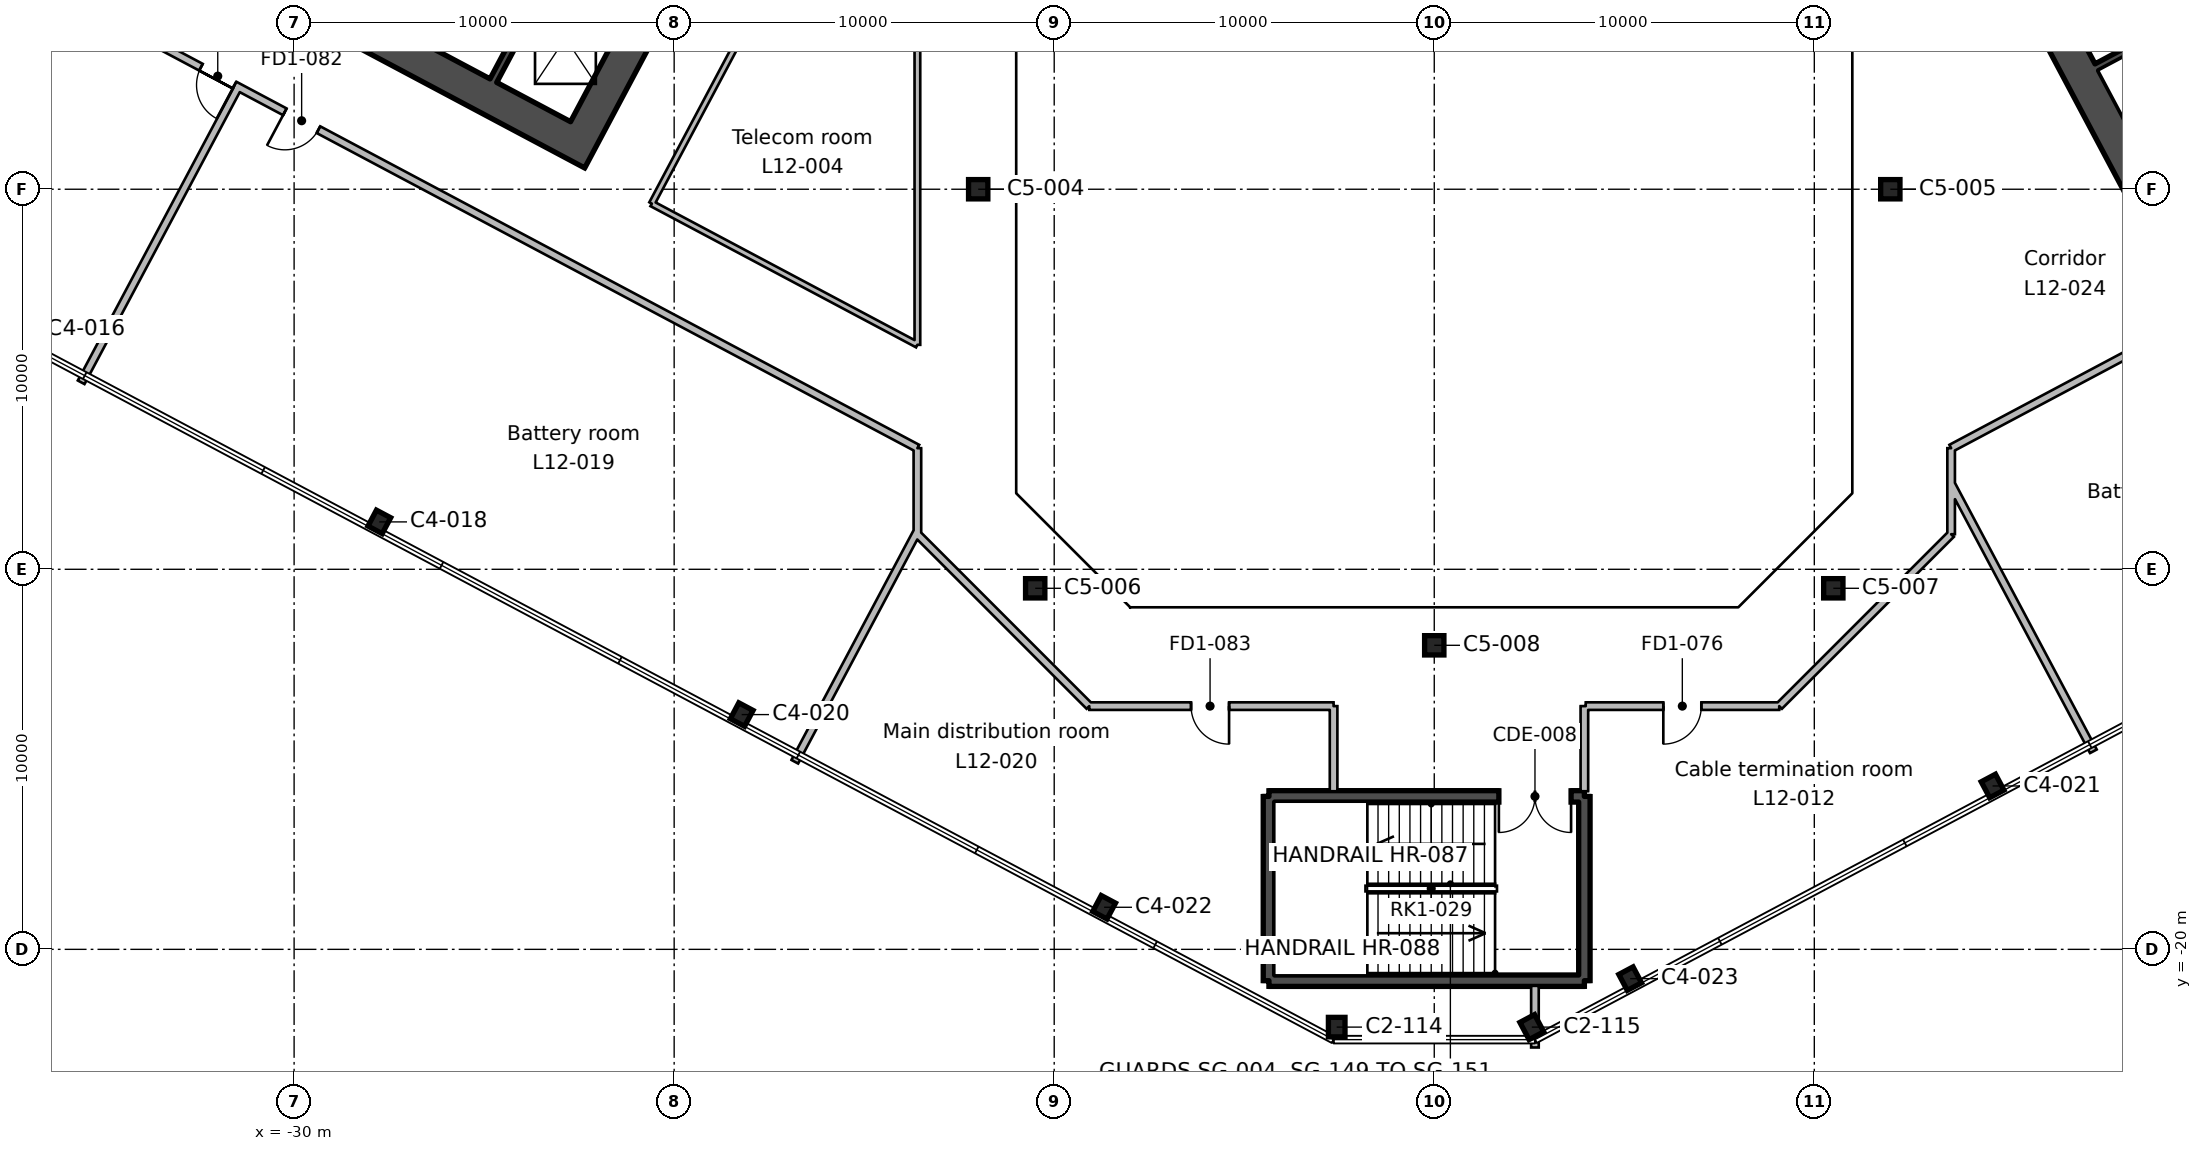
"""IFC4 building model, lengths in metres.
Left out: names, types, materials, properties, quantities, classifications, styles, units other than length and angle.
Written with IfcOpenShell. Run it as: python <this file> out.ifc"""

import sys

from ifc_helpers import new_model, si_unit, direction, frame, frame_2d, origin, origin_2d, place, context, subcontext, project, spatial, rectangle, hollow_rectangle, i_section, extrude, element, fill, save


model = new_model("IFC4")
c1 = context("Model", 3, precision=1e-05, world=origin(), true_north=direction((0.0, 1.0)))
c2 = subcontext(c1, "Body", "Model", "MODEL_VIEW")
j1 = project(units=[si_unit("LENGTHUNIT", "METRE"), si_unit("PLANEANGLEUNIT", "RADIAN")], contexts=[c1])
p1 = place(None, origin())
s1 = spatial("IfcSite", under=j1, at=p1, CompositionType="ELEMENT")
p2 = place(p1, origin())
s2 = spatial("IfcBuilding", under=s1, at=p2, CompositionType="ELEMENT")
p3 = place(p2, frame((0.0, 0.0, 66.2)))
s3 = spatial("IfcBuildingStorey", under=s2, at=p3, CompositionType="ELEMENT", Elevation=66.2)
for number, where, z_axis, x_axis in (
    (1, (-2.567, -22.046, 0.0), (0.0, 0.0, 1.0), (1.0, 0.0, 0.0)),
    (2, (2.567, -22.046, 0.0), (0.0, 0.0, 1.0), (0.883, 0.469, 0.0)),
):
    element("IfcColumn", number, at=place(p3, frame(where, z_axis=z_axis, x_axis=x_axis)), inside=s3, PredefinedType="COLUMN", context=c2, shape_type="SweptSolid", body=[
        extrude(i_section(OverallWidth=0.437, OverallDepth=0.513, WebThickness=0.061, FlangeThickness=0.097, FilletRadius=0.015, at=origin_2d()), origin(), (0.0, 0.0, 1.0), 4.6),
    ])
for number, where, z_axis, x_axis in (
    (3, (5.155, -20.771, 0.0), (0.0, 0.0, 1.0), (0.883, 0.469, 0.0)),
    (4, (-8.687, -18.893, 0.0), (0.0, 0.0, 1.0), (0.883, -0.469, 0.0)),
    (5, (14.691, -15.701, 0.0), (0.0, 0.0, 1.0), (0.883, 0.469, 0.0)),
    (6, (-18.223, -13.823, 0.0), (0.0, 0.0, 1.0), (0.883, -0.469, 0.0)),
):
    element("IfcColumn", number, at=place(p3, frame(where, z_axis=z_axis, x_axis=x_axis)), inside=s3, PredefinedType="COLUMN", context=c2, shape_type="SweptSolid", body=[
        extrude(i_section(OverallWidth=0.424, OverallDepth=0.475, WebThickness=0.048, FlangeThickness=0.077, FilletRadius=0.015, at=origin_2d()), origin(), (0.0, 0.0, 1.0), 4.6),
    ])
for number, where, z_axis, x_axis in (
    (7, (0.0, -12.0, 0.0), (0.0, 0.0, 1.0), (1.0, 0.0, 0.0)),
    (8, (-10.5, -10.5, 0.0), (0.0, 0.0, 1.0), (1.0, 0.0, 0.0)),
    (9, (10.5, -10.5, 0.0), (0.0, 0.0, 1.0), (1.0, 0.0, 0.0)),
):
    element("IfcColumn", number, at=place(p3, frame(where, z_axis=z_axis, x_axis=x_axis)), inside=s3, PredefinedType="COLUMN", context=c2, shape_type="SweptSolid", body=[
        extrude(hollow_rectangle(XDim=0.508, YDim=0.508, WallThickness=0.021, InnerFilletRadius=0.01, OuterFilletRadius=0.031, at=origin_2d()), origin(), (0.0, 0.0, 1.0), 4.6),
    ])
p4 = place(p3, frame((-27.758, -8.753, 0.0), z_axis=(0.0, 0.0, 1.0), x_axis=(0.882947592859, -0.469471562786, 0.0)))
e10 = element("IfcColumn", 10, at=p4, inside=s3, PredefinedType="COLUMN", context=c2, shape_type="SweptSolid", body=[
    extrude(i_section(OverallWidth=0.424, OverallDepth=0.475, WebThickness=0.048, FlangeThickness=0.077, FilletRadius=0.015, at=origin_2d()), origin(), (0.0, 0.0, 1.0), 4.6),
])
for number, where, z_axis, x_axis in (
    (11, (-12.0, 0.0, 0.0), (0.0, 0.0, 1.0), (1.0, 0.0, 0.0)),
    (12, (12.0, 0.0, 0.0), (0.0, 0.0, 1.0), (1.0, 0.0, 0.0)),
):
    element("IfcColumn", number, at=place(p3, frame(where, z_axis=z_axis, x_axis=x_axis)), inside=s3, PredefinedType="COLUMN", context=c2, shape_type="SweptSolid", body=[
        extrude(hollow_rectangle(XDim=0.508, YDim=0.508, WallThickness=0.021, InnerFilletRadius=0.01, OuterFilletRadius=0.031, at=origin_2d()), origin(), (0.0, 0.0, 1.0), 4.6),
    ])
p5 = place(p3, frame((-13.362, 18.43, 0.0), z_axis=(0.0, 0.0, 1.0), x_axis=(-0.46947084998, -0.882947971864, 0.0)))
e13 = element("IfcWall", 13, at=p5, inside=s3, PredefinedType="SHEAR", context=c2, shape_type="SweptSolid", body=[
    extrude(rectangle(XDim=20.0, YDim=0.9, at=frame_2d((10.0, 0.0))), origin(), (0.0, 0.0, 1.0), 4.6),
])
p6 = place(p5, frame((7.0, 0.0, 0.0)))
e14 = element("IfcOpeningElement", 14, at=p6, cuts=e13, PredefinedType="OPENING", context=c2, shape_type="SweptSolid", body=[
    extrude(rectangle(XDim=2.4, YDim=2.4, at=frame_2d((1.2, 1.2))), frame((0.0, 0.46, 0.0), z_axis=(0.0, -1.0, 0.0), x_axis=(1.0, 0.0, 0.0)), (0.0, 0.0, 1.0), 0.92),
])
p7 = place(p3, frame((-22.937, 1.38, 0.0), z_axis=(0.0, 0.0, 1.0), x_axis=(-0.88295276571, 0.46946183394, 0.0)))
e15 = element("IfcWall", 15, at=p7, inside=s3, PredefinedType="SHEAR", context=c2, shape_type="SweptSolid", body=[
    extrude(rectangle(XDim=20.2, YDim=0.9, at=frame_2d((10.1, 0.0))), origin(), (0.0, 0.0, 1.0), 4.6),
])
p8 = place(p3, frame((-23.043, 6.08, 0.0), z_axis=(0.0, 0.0, 1.0), x_axis=(-0.469494272526, -0.882935517501, 0.0)))
e16 = element("IfcWall", 16, at=p8, inside=s3, PredefinedType="SHEAR", context=c2, shape_type="SweptSolid", body=[
    extrude(rectangle(XDim=3.65, YDim=0.2, at=frame_2d((1.825, 0.0))), origin(), (0.0, 0.0, 1.0), 4.6),
])
p9 = place(p3, frame((19.219, -1.107, 0.0), z_axis=(0.0, 0.0, 1.0), x_axis=(-0.46947084998, 0.882947971864, 0.0)))
e17 = element("IfcWall", 17, at=p9, inside=s3, PredefinedType="SHEAR", context=c2, shape_type="SweptSolid", body=[
    extrude(rectangle(XDim=20.0, YDim=0.9, at=frame_2d((10.0, 0.0))), origin(), (0.0, 0.0, 1.0), 4.6),
])
p10 = place(p9, frame((7.0, 0.0, 0.0)))
e18 = element("IfcOpeningElement", 18, at=p10, cuts=e17, PredefinedType="OPENING", context=c2, shape_type="SweptSolid", body=[
    extrude(rectangle(XDim=2.4, YDim=2.4, at=frame_2d((1.2, 1.2))), frame((0.0, 0.46, 0.0), z_axis=(0.0, -1.0, 0.0), x_axis=(1.0, 0.0, 0.0)), (0.0, 0.0, 1.0), 0.92),
])
p11 = place(p3, frame((17.434, 3.21, 0.0), z_axis=(0.0, 0.0, 1.0), x_axis=(0.882940221191, 0.469485426614, 0.0)))
e19 = element("IfcWall", 19, at=p11, inside=s3, PredefinedType="SHEAR", context=c2, shape_type="SweptSolid", body=[
    extrude(rectangle(XDim=8.0, YDim=0.2, at=frame_2d((4.0, 0.0))), origin(), (0.0, 0.0, 1.0), 4.6),
])
p12 = place(p3, frame((3.95, -15.975, 0.0), z_axis=(0.0, 0.0, 1.0), x_axis=(0.0, -1.0, 0.0)))
e20 = element("IfcWall", 20, at=p12, inside=s3, PredefinedType="SHEAR", context=c2, shape_type="SweptSolid", body=[
    extrude(rectangle(XDim=4.85, YDim=0.3, at=frame_2d((2.425, 0.0))), origin(), (0.0, 0.0, 1.0), 4.6),
])
p13 = place(p3, frame((3.95, -20.825, 0.0), z_axis=(0.0, 0.0, 1.0), x_axis=(-1.0, 0.0, 0.0)))
e21 = element("IfcWall", 21, at=p13, inside=s3, PredefinedType="SHEAR", context=c2, shape_type="SweptSolid", body=[
    extrude(rectangle(XDim=8.3, YDim=0.3, at=frame_2d((4.15, 0.0))), origin(), (0.0, 0.0, 1.0), 4.6),
])
p14 = place(p3, frame((-4.35, -20.825, 0.0), z_axis=(0.0, 0.0, 1.0), x_axis=(0.0, 1.0, 0.0)))
e22 = element("IfcWall", 22, at=p14, inside=s3, PredefinedType="SHEAR", context=c2, shape_type="SweptSolid", body=[
    extrude(rectangle(XDim=4.85, YDim=0.3, at=frame_2d((2.425, 0.0))), origin(), (0.0, 0.0, 1.0), 4.6),
])
p15 = place(p3, frame((-4.35, -15.975, 0.0), z_axis=(0.0, 0.0, 1.0), x_axis=(1.0, 0.0, 0.0)))
e23 = element("IfcWall", 23, at=p15, inside=s3, PredefinedType="SHEAR", context=c2, shape_type="SweptSolid", body=[
    extrude(rectangle(XDim=8.3, YDim=0.3, at=frame_2d((4.15, 0.0))), origin(), (0.0, 0.0, 1.0), 4.6),
])
p16 = place(p15, frame((6.05, 0.0, 0.0)))
e24 = element("IfcOpeningElement", 24, at=p16, cuts=e23, PredefinedType="OPENING", context=c2, shape_type="SweptSolid", body=[
    extrude(rectangle(XDim=1.9, YDim=2.1, at=frame_2d((0.95, 1.05))), frame((0.0, 0.16, 0.0), z_axis=(0.0, -1.0, 0.0), x_axis=(1.0, 0.0, 0.0)), (0.0, 0.0, 1.0), 0.32),
])
p17 = place(p3, frame((-31.471, 2.69, 0.0), z_axis=(0.0, 0.0, 1.0), x_axis=(-0.469532456729, -0.882915212281, 0.0)))
e25 = element("IfcWall", 25, at=p17, inside=s3, PredefinedType="PARTITIONING", context=c2, shape_type="SweptSolid", body=[
    extrude(rectangle(XDim=8.8, YDim=0.2, at=frame_2d((4.4, 0.0))), origin(), (0.0, 0.0, 1.0), 4.2),
])
p18 = place(p3, frame((-13.6, -9.077, 0.0), z_axis=(0.0, 0.0, 1.0), x_axis=(0.0, 1.0, 0.0)))
e26 = element("IfcWall", 26, at=p18, inside=s3, PredefinedType="PARTITIONING", context=c2, shape_type="SweptSolid", body=[
    extrude(rectangle(XDim=2.264, YDim=0.2, at=frame_2d((1.132, 0.0))), origin(), (0.0, 0.0, 1.0), 4.2),
])
p19 = place(p3, frame((-13.6, -6.813, 0.0), z_axis=(0.0, 0.0, 1.0), x_axis=(-0.882934546757, 0.469496098113, 0.0)))
e27 = element("IfcWall", 27, at=p19, inside=s3, PredefinedType="PARTITIONING", context=c2, shape_type="SweptSolid", body=[
    extrude(rectangle(XDim=36.758, YDim=0.2, at=frame_2d((18.379, 0.0))), origin(), (0.0, 0.0, 1.0), 4.2),
])
p20 = place(p19, frame((20.35, 0.0, 0.0)))
e28 = element("IfcOpeningElement", 28, at=p20, cuts=e27, PredefinedType="OPENING", context=c2, shape_type="SweptSolid", body=[
    extrude(rectangle(XDim=1.0, YDim=2.1, at=frame_2d((0.5, 1.05))), frame((0.0, 0.11, 0.0), z_axis=(0.0, -1.0, 0.0), x_axis=(1.0, 0.0, 0.0)), (0.0, 0.0, 1.0), 0.22),
])
p21 = place(p19, frame((17.85, 0.0, 0.0)))
e29 = element("IfcOpeningElement", 29, at=p21, cuts=e27, PredefinedType="OPENING", context=c2, shape_type="SweptSolid", body=[
    extrude(rectangle(XDim=1.0, YDim=2.1, at=frame_2d((0.5, 1.05))), frame((0.0, 0.11, 0.0), z_axis=(0.0, -1.0, 0.0), x_axis=(1.0, 0.0, 0.0)), (0.0, 0.0, 1.0), 0.22),
])
p22 = place(p3, frame((-13.6, -8.998, 0.0), z_axis=(0.0, 0.0, 1.0), x_axis=(-0.469531053644, -0.882915958438, 0.0)))
e30 = element("IfcWall", 30, at=p22, inside=s3, PredefinedType="PARTITIONING", context=c2, shape_type="SweptSolid", body=[
    extrude(rectangle(XDim=6.87, YDim=0.2, at=frame_2d((3.435, 0.0))), origin(), (0.0, 0.0, 1.0), 4.2),
])
p23 = place(p3, frame((-13.6, -9.077, 0.0), z_axis=(0.0, 0.0, 1.0), x_axis=(0.707106781187, -0.707106781187, 0.0)))
e31 = element("IfcWall", 31, at=p23, inside=s3, PredefinedType="PARTITIONING", context=c2, shape_type="SweptSolid", body=[
    extrude(rectangle(XDim=6.397, YDim=0.2, at=frame_2d((3.198, 0.0))), origin(), (0.0, 0.0, 1.0), 4.2),
])
p24 = place(p3, frame((-2.649, -15.84, 0.0), z_axis=(0.0, 0.0, 1.0), x_axis=(0.0, 1.0, 0.0)))
e32 = element("IfcWall", 32, at=p24, inside=s3, PredefinedType="PARTITIONING", context=c2, shape_type="SweptSolid", body=[
    extrude(rectangle(XDim=2.24, YDim=0.2, at=frame_2d((1.12, 0.0))), origin(), (0.0, 0.0, 1.0), 4.2),
])
p25 = place(p3, frame((-2.649, -13.6, 0.0), z_axis=(0.0, 0.0, 1.0), x_axis=(-1.0, 0.0, 0.0)))
e33 = element("IfcWall", 33, at=p25, inside=s3, PredefinedType="PARTITIONING", context=c2, shape_type="SweptSolid", body=[
    extrude(rectangle(XDim=6.428, YDim=0.2, at=frame_2d((3.214, 0.0))), origin(), (0.0, 0.0, 1.0), 4.2),
])
p26 = place(p25, frame((2.75, 0.0, 0.0)))
e34 = element("IfcOpeningElement", 34, at=p26, cuts=e33, PredefinedType="OPENING", context=c2, shape_type="SweptSolid", body=[
    extrude(rectangle(XDim=1.0, YDim=2.1, at=frame_2d((0.5, 1.05))), frame((0.0, 0.11, 0.0), z_axis=(0.0, -1.0, 0.0), x_axis=(1.0, 0.0, 0.0)), (0.0, 0.0, 1.0), 0.22),
])
p27 = place(p3, frame((2.649, -22.582, 0.0), z_axis=(0.0, 0.0, 1.0), x_axis=(0.0, 1.0, 0.0)))
e35 = element("IfcWall", 35, at=p27, inside=s3, PredefinedType="PARTITIONING", context=c2, shape_type="SweptSolid", body=[
    extrude(rectangle(XDim=1.622, YDim=0.2, at=frame_2d((0.811, 0.0))), origin(), (0.0, 0.0, 1.0), 4.2),
])
p28 = place(p3, frame((3.95, -13.6, 0.0), z_axis=(0.0, 0.0, 1.0), x_axis=(0.0, -1.0, 0.0)))
e36 = element("IfcWall", 36, at=p28, inside=s3, PredefinedType="PARTITIONING", context=c2, shape_type="SweptSolid", body=[
    extrude(rectangle(XDim=2.24, YDim=0.2, at=frame_2d((1.12, 0.0))), origin(), (0.0, 0.0, 1.0), 4.2),
])
p29 = place(p3, frame((13.6, -7.756, 0.0), z_axis=(0.0, 0.0, 1.0), x_axis=(0.0, -1.0, 0.0)))
e37 = element("IfcWall", 37, at=p29, inside=s3, PredefinedType="PARTITIONING", context=c2, shape_type="SweptSolid", body=[
    extrude(rectangle(XDim=1.321, YDim=0.2, at=frame_2d((0.66, 0.0))), origin(), (0.0, 0.0, 1.0), 4.2),
])
p30 = place(p3, frame((13.6, -9.077, 0.0), z_axis=(0.0, 0.0, 1.0), x_axis=(-0.707106781187, -0.707106781187, 0.0)))
e38 = element("IfcWall", 38, at=p30, inside=s3, PredefinedType="PARTITIONING", context=c2, shape_type="SweptSolid", body=[
    extrude(rectangle(XDim=6.397, YDim=0.2, at=frame_2d((3.198, 0.0))), origin(), (0.0, 0.0, 1.0), 4.2),
])
p31 = place(p3, frame((9.077, -13.6, 0.0), z_axis=(0.0, 0.0, 1.0), x_axis=(-1.0, 0.0, 0.0)))
e39 = element("IfcWall", 39, at=p31, inside=s3, PredefinedType="PARTITIONING", context=c2, shape_type="SweptSolid", body=[
    extrude(rectangle(XDim=5.092, YDim=0.2, at=frame_2d((2.546, 0.0))), origin(), (0.0, 0.0, 1.0), 4.2),
])
p32 = place(p31, frame((2.05, 0.0, 0.0)))
e40 = element("IfcOpeningElement", 40, at=p32, cuts=e39, PredefinedType="OPENING", context=c2, shape_type="SweptSolid", body=[
    extrude(rectangle(XDim=1.0, YDim=2.1, at=frame_2d((0.5, 1.05))), frame((0.0, 0.11, 0.0), z_axis=(0.0, -1.0, 0.0), x_axis=(1.0, 0.0, 0.0)), (0.0, 0.0, 1.0), 0.22),
])
p33 = place(p3, frame((13.6, -7.75, 0.0), z_axis=(0.0, 0.0, 1.0), x_axis=(0.469489555723, -0.882938025609, 0.0)))
e41 = element("IfcWall", 41, at=p33, inside=s3, PredefinedType="PARTITIONING", context=c2, shape_type="SweptSolid", body=[
    extrude(rectangle(XDim=7.972, YDim=0.2, at=frame_2d((3.986, 0.0))), origin(), (0.0, 0.0, 1.0), 4.2),
])
p34 = place(p3, frame((69.57, 22.948, 0.0), z_axis=(0.0, 0.0, 1.0), x_axis=(-0.882939582192, -0.469486628349, 0.0)))
e42 = element("IfcWall", 42, at=p34, inside=s3, PredefinedType="PARTITIONING", context=c2, shape_type="SweptSolid", body=[
    extrude(rectangle(XDim=63.39, YDim=0.2, at=frame_2d((31.695, 0.0))), origin(), (0.0, 0.0, 1.0), 4.2),
])
p35 = place(p34, frame((41.971, 0.0, 0.0)))
e43 = element("IfcOpeningElement", 43, at=p35, cuts=e42, PredefinedType="OPENING", context=c2, shape_type="SweptSolid", body=[
    extrude(rectangle(XDim=1.0, YDim=2.1, at=frame_2d((0.5, 1.05))), frame((0.0, 0.11, 0.0), z_axis=(0.0, -1.0, 0.0), x_axis=(1.0, 0.0, 0.0)), (0.0, 0.0, 1.0), 0.22),
])
p36 = place(p34, frame((31.371, 0.0, 0.0)))
e44 = element("IfcOpeningElement", 44, at=p36, cuts=e42, PredefinedType="OPENING", context=c2, shape_type="SweptSolid", body=[
    extrude(rectangle(XDim=1.0, YDim=2.1, at=frame_2d((0.5, 1.05))), frame((0.0, 0.11, 0.0), z_axis=(0.0, -1.0, 0.0), x_axis=(1.0, 0.0, 0.0)), (0.0, 0.0, 1.0), 0.22),
])
p37 = place(p34, frame((24.071, 0.0, 0.0)))
e45 = element("IfcOpeningElement", 45, at=p37, cuts=e42, PredefinedType="OPENING", context=c2, shape_type="SweptSolid", body=[
    extrude(rectangle(XDim=1.0, YDim=2.1, at=frame_2d((0.5, 1.05))), frame((0.0, 0.11, 0.0), z_axis=(0.0, -1.0, 0.0), x_axis=(1.0, 0.0, 0.0)), (0.0, 0.0, 1.0), 0.22),
])
p38 = place(p34, frame((13.071, 0.0, 0.0)))
e46 = element("IfcOpeningElement", 46, at=p38, cuts=e42, PredefinedType="OPENING", context=c2, shape_type="SweptSolid", body=[
    extrude(rectangle(XDim=1.0, YDim=2.1, at=frame_2d((0.5, 1.05))), frame((0.0, 0.11, 0.0), z_axis=(0.0, -1.0, 0.0), x_axis=(1.0, 0.0, 0.0)), (0.0, 0.0, 1.0), 0.22),
])
p39 = place(p3, frame((13.6, -6.813, 0.0), z_axis=(0.0, 0.0, 1.0), x_axis=(0.0, -1.0, 0.0)))
e47 = element("IfcWall", 47, at=p39, inside=s3, PredefinedType="PARTITIONING", context=c2, shape_type="SweptSolid", body=[
    extrude(rectangle(XDim=0.943, YDim=0.2, at=frame_2d((0.472, 0.0))), origin(), (0.0, 0.0, 1.0), 4.2),
])
p40 = place(p3, frame((-20.588, -0.379, 0.0), z_axis=(0.0, 0.0, 1.0), x_axis=(0.469489882812, 0.882937851685, 0.0)))
e48 = element("IfcWall", 48, at=p40, inside=s3, PredefinedType="PARTITIONING", context=c2, shape_type="SweptSolid", body=[
    extrude(rectangle(XDim=20.0, YDim=0.15, at=frame_2d((10.0, 0.0))), origin(), (0.0, 0.0, 1.0), 4.2),
])
p41 = place(p40, frame((9.55, 0.0, 0.0)))
e49 = element("IfcOpeningElement", 49, at=p41, cuts=e48, PredefinedType="OPENING", context=c2, shape_type="SweptSolid", body=[
    extrude(rectangle(XDim=1.0, YDim=2.1, at=frame_2d((0.5, 1.05))), frame((0.0, 0.085, 0.0), z_axis=(0.0, -1.0, 0.0), x_axis=(1.0, 0.0, 0.0)), (0.0, 0.0, 1.0), 0.17),
])
p42 = place(p3, frame((-13.6, 9.077, 0.0), z_axis=(0.0, 0.0, 1.0), x_axis=(0.0, -1.0, 0.0)))
e50 = element("IfcWall", 50, at=p42, inside=s3, PredefinedType="PARTITIONING", context=c2, shape_type="SweptSolid", body=[
    extrude(rectangle(XDim=13.171, YDim=0.15, at=frame_2d((6.585, 0.0))), origin(), (0.0, 0.0, 1.0), 4.2),
])
p43 = place(p3, frame((-13.6, -4.094, 0.0), z_axis=(0.0, 0.0, 1.0), x_axis=(-0.882967890474, 0.469433386533, 0.0)))
e51 = element("IfcWall", 51, at=p43, inside=s3, PredefinedType="PARTITIONING", context=c2, shape_type="SweptSolid", body=[
    extrude(rectangle(XDim=7.914, YDim=0.15, at=frame_2d((3.957, 0.0))), origin(), (0.0, 0.0, 1.0), 4.2),
])
p44 = place(p16, frame((1.9, 0.0, 0.0), z_axis=(0.0, 0.0, 1.0), x_axis=(-1.0, 0.0, 0.0)))
e52 = element("IfcDoor", 52, at=p44, inside=s3, OperationType="DOUBLE_DOOR_SINGLE_SWING", PredefinedType="DOOR", context=c2, shape_type="SweptSolid", body=[
    extrude(rectangle(XDim=1.9, YDim=2.1, at=frame_2d((0.95, 1.05))), frame((0.0, 0.025, 0.0), z_axis=(0.0, -1.0, 0.0), x_axis=(1.0, 0.0, 0.0)), (0.0, 0.0, 1.0), 0.05),
])
fill(e24, e52)
p45 = place(p32, origin())
e53 = element("IfcDoor", 53, at=p45, inside=s3, OperationType="SINGLE_SWING_RIGHT", PredefinedType="DOOR", context=c2, shape_type="SweptSolid", body=[
    extrude(rectangle(XDim=1.0, YDim=2.1, at=frame_2d((0.5, 1.05))), frame((0.0, 0.025, 0.0), z_axis=(0.0, -1.0, 0.0), x_axis=(1.0, 0.0, 0.0)), (0.0, 0.0, 1.0), 0.05),
])
fill(e40, e53)
p46 = place(p20, origin())
e54 = element("IfcDoor", 54, at=p46, inside=s3, OperationType="SINGLE_SWING_LEFT", PredefinedType="DOOR", context=c2, shape_type="SweptSolid", body=[
    extrude(rectangle(XDim=1.0, YDim=2.1, at=frame_2d((0.5, 1.05))), frame((0.0, 0.025, 0.0), z_axis=(0.0, -1.0, 0.0), x_axis=(1.0, 0.0, 0.0)), (0.0, 0.0, 1.0), 0.05),
])
fill(e28, e54)
p47 = place(p21, origin())
e55 = element("IfcDoor", 55, at=p47, inside=s3, OperationType="SINGLE_SWING_RIGHT", PredefinedType="DOOR", context=c2, shape_type="SweptSolid", body=[
    extrude(rectangle(XDim=1.0, YDim=2.1, at=frame_2d((0.5, 1.05))), frame((0.0, 0.025, 0.0), z_axis=(0.0, -1.0, 0.0), x_axis=(1.0, 0.0, 0.0)), (0.0, 0.0, 1.0), 0.05),
])
fill(e29, e55)
p48 = place(p26, origin())
e56 = element("IfcDoor", 56, at=p48, inside=s3, OperationType="SINGLE_SWING_LEFT", PredefinedType="DOOR", context=c2, shape_type="SweptSolid", body=[
    extrude(rectangle(XDim=1.0, YDim=2.1, at=frame_2d((0.5, 1.05))), frame((0.0, 0.025, 0.0), z_axis=(0.0, -1.0, 0.0), x_axis=(1.0, 0.0, 0.0)), (0.0, 0.0, 1.0), 0.05),
])
fill(e34, e56)
save(model, sys.argv[1])
